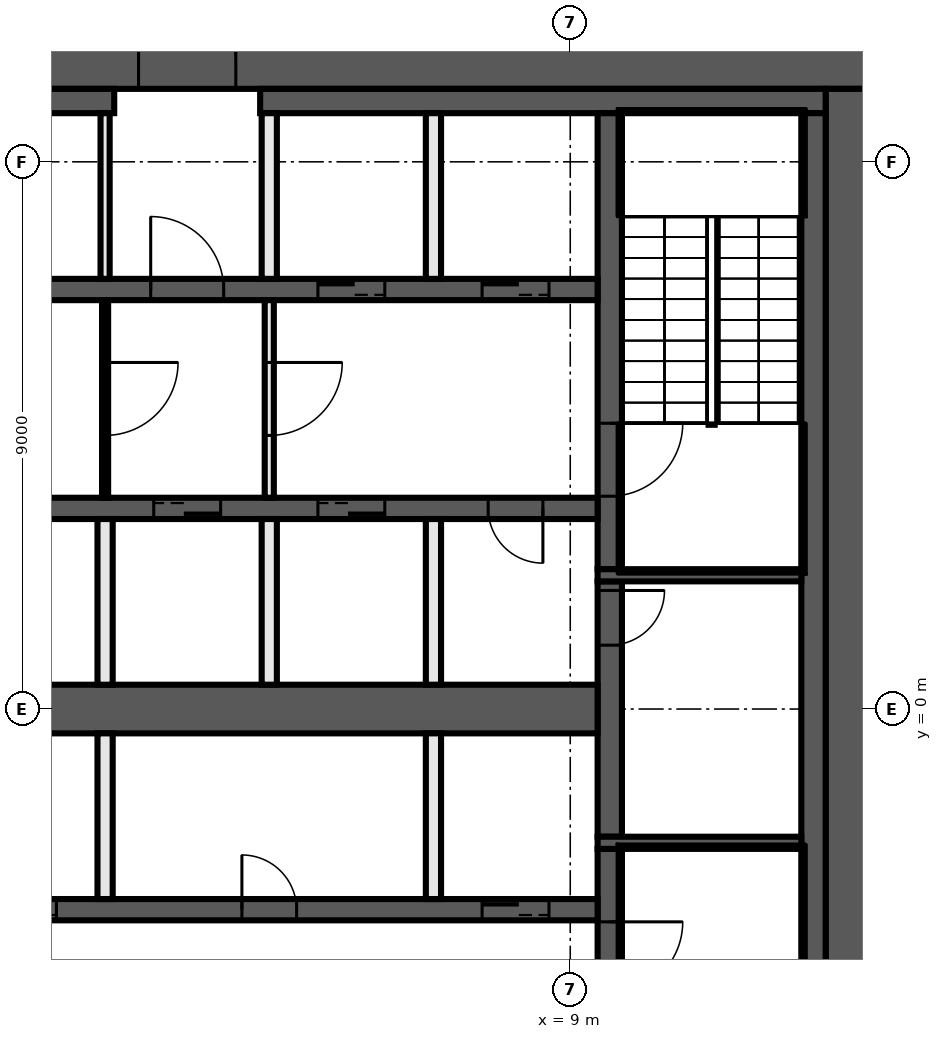
"""IFC4 building model, lengths in metres.
Left out: names, types, materials, properties, quantities, classifications, styles, units other than length and angle.
Written with IfcOpenShell. Run it as: python <this file> out.ifc"""

import sys

from ifc_helpers import new_model, si_unit, direction, frame, frame_2d, origin, place, context, subcontext, project, spatial, rectangle, extrude, element, fill, save


model = new_model("IFC4")
c1 = context("Model", 3, precision=1e-05, world=origin(), true_north=direction((0.0, 1.0)))
c2 = subcontext(c1, "Body", "Model", "MODEL_VIEW")
j1 = project(units=[si_unit("LENGTHUNIT", "METRE"), si_unit("PLANEANGLEUNIT", "RADIAN")], contexts=[c1])
p1 = place(None, origin())
s1 = spatial("IfcSite", under=j1, at=p1, CompositionType="ELEMENT")
p2 = place(p1, origin())
s2 = spatial("IfcBuilding", under=s1, at=p2, CompositionType="ELEMENT")
p3 = place(p2, frame((0.0, 0.0, 183.8)))
s3 = spatial("IfcBuildingStorey", under=s2, at=p3, CompositionType="ELEMENT", Elevation=183.8)
p4 = place(p3, frame((-14.0, 10.6, 0.0), z_axis=(0.0, 0.0, 1.0), x_axis=(1.0, 0.0, 0.0)))
e1 = element("IfcWall", 1, at=p4, inside=s3, PredefinedType="SHEAR", context=c2, shape_type="SweptSolid", body=[
    extrude(rectangle(XDim=28.0, YDim=0.8, at=frame_2d((14.0, 0.0))), origin(), (0.0, 0.0, 1.0), 14.62),
])
p5 = place(p4, frame((15.9, 0.0, 0.0)))
e2 = element("IfcOpeningElement", 2, at=p5, cuts=e1, PredefinedType="OPENING", context=c2, shape_type="SweptSolid", body=[
    extrude(rectangle(XDim=1.6, YDim=2.1, at=frame_2d((0.8, 1.05))), frame((0.0, 0.41, 0.0), z_axis=(0.0, -1.0, 0.0), x_axis=(1.0, 0.0, 0.0)), (0.0, 0.0, 1.0), 0.82),
])
p6 = place(p3, frame((13.6, 10.2, 0.0), z_axis=(0.0, 0.0, 1.0), x_axis=(0.0, -1.0, 0.0)))
e3 = element("IfcWall", 3, at=p6, inside=s3, PredefinedType="SHEAR", context=c2, shape_type="SweptSolid", body=[
    extrude(rectangle(XDim=20.4, YDim=0.8, at=frame_2d((10.2, 0.0))), origin(), (0.0, 0.0, 1.0), 14.62),
])
p7 = place(p3, frame((-13.2, 10.0, 0.0), z_axis=(0.0, 0.0, 1.0), x_axis=(1.0, 0.0, 0.0)))
e4 = element("IfcWall", 4, at=p7, inside=s3, PredefinedType="SHEAR", context=c2, shape_type="SweptSolid", body=[
    extrude(rectangle(XDim=14.7, YDim=0.4, at=frame_2d((7.35, 0.0))), origin(), (0.0, 0.0, 1.0), 14.62),
])
p8 = place(p3, frame((3.9, 10.0, 0.0), z_axis=(0.0, 0.0, 1.0), x_axis=(1.0, 0.0, 0.0)))
e5 = element("IfcWall", 5, at=p8, inside=s3, PredefinedType="SHEAR", context=c2, shape_type="SweptSolid", body=[
    extrude(rectangle(XDim=9.3, YDim=0.4, at=frame_2d((4.65, 0.0))), origin(), (0.0, 0.0, 1.0), 14.62),
])
p9 = place(p3, frame((13.0, 9.8, 0.0), z_axis=(0.0, 0.0, 1.0), x_axis=(0.0, -1.0, 0.0)))
e6 = element("IfcWall", 6, at=p9, inside=s3, PredefinedType="SHEAR", context=c2, shape_type="SweptSolid", body=[
    extrude(rectangle(XDim=19.6, YDim=0.4, at=frame_2d((9.8, 0.0))), origin(), (0.0, 0.0, 1.0), 14.62),
])
p10 = place(p3, frame((9.65, -2.3, 0.0), z_axis=(0.0, 0.0, 1.0), x_axis=(0.0, -1.0, 0.0)))
e7 = element("IfcWall", 7, at=p10, inside=s3, PredefinedType="SHEAR", context=c2, shape_type="SweptSolid", body=[
    extrude(rectangle(XDim=7.5, YDim=0.4, at=frame_2d((3.75, 0.0))), origin(), (0.0, 0.0, 1.0), 14.62),
])
p11 = place(p10, frame((1.2, 0.0, 0.0)))
e8 = element("IfcOpeningElement", 8, at=p11, cuts=e7, PredefinedType="OPENING", context=c2, shape_type="SweptSolid", body=[
    extrude(rectangle(XDim=1.2, YDim=2.1, at=frame_2d((0.6, 1.05))), frame((0.0, 0.21, 0.0), z_axis=(0.0, -1.0, 0.0), x_axis=(1.0, 0.0, 0.0)), (0.0, 0.0, 1.0), 0.42),
])
p12 = place(p3, frame((9.65, 2.1, 0.0), z_axis=(0.0, 0.0, 1.0), x_axis=(0.0, -1.0, 0.0)))
e9 = element("IfcWall", 9, at=p12, inside=s3, PredefinedType="SHEAR", context=c2, shape_type="SweptSolid", body=[
    extrude(rectangle(XDim=4.2, YDim=0.4, at=frame_2d((2.1, 0.0))), origin(), (0.0, 0.0, 1.0), 14.62),
])
p13 = place(p12, frame((0.15, 0.0, 0.0)))
e10 = element("IfcOpeningElement", 10, at=p13, cuts=e9, PredefinedType="OPENING", context=c2, shape_type="SweptSolid", body=[
    extrude(rectangle(XDim=0.9, YDim=2.1, at=frame_2d((0.45, 1.05))), frame((0.0, 0.21, 0.0), z_axis=(0.0, -1.0, 0.0), x_axis=(1.0, 0.0, 0.0)), (0.0, 0.0, 1.0), 0.42),
])
p14 = place(p3, frame((9.65, 9.8, 0.0), z_axis=(0.0, 0.0, 1.0), x_axis=(0.0, -1.0, 0.0)))
e11 = element("IfcWall", 11, at=p14, inside=s3, PredefinedType="SHEAR", context=c2, shape_type="SweptSolid", body=[
    extrude(rectangle(XDim=7.5, YDim=0.4, at=frame_2d((3.75, 0.0))), origin(), (0.0, 0.0, 1.0), 14.62),
])
p15 = place(p14, frame((5.1, 0.0, 0.0)))
e12 = element("IfcOpeningElement", 12, at=p15, cuts=e11, PredefinedType="OPENING", context=c2, shape_type="SweptSolid", body=[
    extrude(rectangle(XDim=1.2, YDim=2.1, at=frame_2d((0.6, 1.05))), frame((0.0, 0.21, 0.0), z_axis=(0.0, -1.0, 0.0), x_axis=(1.0, 0.0, 0.0)), (0.0, 0.0, 1.0), 0.42),
])
for number, where, z_axis, x_axis in (
    (13, (9.45, 2.2, 0.0), (0.0, 0.0, 1.0), (1.0, 0.0, 0.0)),
    (14, (9.45, -2.2, 0.0), (0.0, 0.0, 1.0), (1.0, 0.0, 0.0)),
):
    element("IfcWall", number, at=place(p3, frame(where, z_axis=z_axis, x_axis=x_axis)), inside=s3, PredefinedType="SHEAR", context=c2, shape_type="SweptSolid", body=[
        extrude(rectangle(XDim=3.35, YDim=0.2, at=frame_2d((1.675, 0.0))), origin(), (0.0, 0.0, 1.0), 14.62),
    ])
p16 = place(p3, frame((-9.45, 6.9, 0.0), z_axis=(0.0, 0.0, 1.0), x_axis=(1.0, 0.0, 0.0)))
e15 = element("IfcWall", 15, at=p16, inside=s3, PredefinedType="SHEAR", context=c2, shape_type="SweptSolid", body=[
    extrude(rectangle(XDim=18.9, YDim=0.35, at=frame_2d((9.45, 0.0))), origin(), (0.0, 0.0, 1.0), 14.62),
])
p17 = place(p16, frame((11.55, 0.0, 0.0)))
e16 = element("IfcOpeningElement", 16, at=p17, cuts=e15, PredefinedType="OPENING", context=c2, shape_type="SweptSolid", body=[
    extrude(rectangle(XDim=1.2, YDim=2.1, at=frame_2d((0.6, 1.05))), frame((0.0, 0.185, 0.0), z_axis=(0.0, -1.0, 0.0), x_axis=(1.0, 0.0, 0.0)), (0.0, 0.0, 1.0), 0.37),
])
p18 = place(p16, frame((14.3, 0.0, 0.0)))
e17 = element("IfcOpeningElement", 17, at=p18, cuts=e15, PredefinedType="OPENING", context=c2, shape_type="SweptSolid", body=[
    extrude(rectangle(XDim=1.1, YDim=2.1, at=frame_2d((0.55, 1.05))), frame((0.0, 0.185, 0.0), z_axis=(0.0, -1.0, 0.0), x_axis=(1.0, 0.0, 0.0)), (0.0, 0.0, 1.0), 0.37),
])
p19 = place(p16, frame((17.0, 0.0, 0.0)))
e18 = element("IfcOpeningElement", 18, at=p19, cuts=e15, PredefinedType="OPENING", context=c2, shape_type="SweptSolid", body=[
    extrude(rectangle(XDim=1.1, YDim=2.1, at=frame_2d((0.55, 1.05))), frame((0.0, 0.185, 0.0), z_axis=(0.0, -1.0, 0.0), x_axis=(1.0, 0.0, 0.0)), (0.0, 0.0, 1.0), 0.37),
])
p20 = place(p16, frame((3.6, 0.0, 0.0)))
e19 = element("IfcOpeningElement", 19, at=p20, cuts=e15, PredefinedType="OPENING", context=c2, shape_type="SweptSolid", body=[
    extrude(rectangle(XDim=0.9, YDim=2.1, at=frame_2d((0.45, 1.05))), frame((0.0, 0.185, 0.0), z_axis=(0.0, -1.0, 0.0), x_axis=(1.0, 0.0, 0.0)), (0.0, 0.0, 1.0), 0.37),
])
p21 = place(p16, frame((9.0, 0.0, 0.0)))
e20 = element("IfcOpeningElement", 20, at=p21, cuts=e15, PredefinedType="OPENING", context=c2, shape_type="SweptSolid", body=[
    extrude(rectangle(XDim=0.9, YDim=2.1, at=frame_2d((0.45, 1.05))), frame((0.0, 0.185, 0.0), z_axis=(0.0, -1.0, 0.0), x_axis=(1.0, 0.0, 0.0)), (0.0, 0.0, 1.0), 0.37),
])
p22 = place(p3, frame((9.45, 3.3, 0.0), z_axis=(0.0, 0.0, 1.0), x_axis=(-1.0, 0.0, 0.0)))
e21 = element("IfcWall", 21, at=p22, inside=s3, PredefinedType="SHEAR", context=c2, shape_type="SweptSolid", body=[
    extrude(rectangle(XDim=18.9, YDim=0.35, at=frame_2d((9.45, 0.0))), origin(), (0.0, 0.0, 1.0), 14.62),
])
p23 = place(p22, frame((6.2, 0.0, 0.0)))
e22 = element("IfcOpeningElement", 22, at=p23, cuts=e21, PredefinedType="OPENING", context=c2, shape_type="SweptSolid", body=[
    extrude(rectangle(XDim=1.1, YDim=2.1, at=frame_2d((0.55, 1.05))), frame((0.0, 0.185, 0.0), z_axis=(0.0, -1.0, 0.0), x_axis=(1.0, 0.0, 0.0)), (0.0, 0.0, 1.0), 0.37),
])
p24 = place(p22, frame((3.5, 0.0, 0.0)))
e23 = element("IfcOpeningElement", 23, at=p24, cuts=e21, PredefinedType="OPENING", context=c2, shape_type="SweptSolid", body=[
    extrude(rectangle(XDim=1.1, YDim=2.1, at=frame_2d((0.55, 1.05))), frame((0.0, 0.185, 0.0), z_axis=(0.0, -1.0, 0.0), x_axis=(1.0, 0.0, 0.0)), (0.0, 0.0, 1.0), 0.37),
])
p25 = place(p22, frame((0.9, 0.0, 0.0)))
e24 = element("IfcOpeningElement", 24, at=p25, cuts=e21, PredefinedType="OPENING", context=c2, shape_type="SweptSolid", body=[
    extrude(rectangle(XDim=0.9, YDim=2.1, at=frame_2d((0.45, 1.05))), frame((0.0, 0.185, 0.0), z_axis=(0.0, -1.0, 0.0), x_axis=(1.0, 0.0, 0.0)), (0.0, 0.0, 1.0), 0.37),
])
p26 = place(p22, frame((17.1, 0.0, 0.0)))
e25 = element("IfcOpeningElement", 25, at=p26, cuts=e21, PredefinedType="OPENING", context=c2, shape_type="SweptSolid", body=[
    extrude(rectangle(XDim=0.9, YDim=2.1, at=frame_2d((0.45, 1.05))), frame((0.0, 0.185, 0.0), z_axis=(0.0, -1.0, 0.0), x_axis=(1.0, 0.0, 0.0)), (0.0, 0.0, 1.0), 0.37),
])
p27 = place(p22, frame((13.05, 0.0, 0.0)))
e26 = element("IfcOpeningElement", 26, at=p27, cuts=e21, PredefinedType="OPENING", context=c2, shape_type="SweptSolid", body=[
    extrude(rectangle(XDim=0.9, YDim=2.1, at=frame_2d((0.45, 1.05))), frame((0.0, 0.185, 0.0), z_axis=(0.0, -1.0, 0.0), x_axis=(1.0, 0.0, 0.0)), (0.0, 0.0, 1.0), 0.37),
])
p28 = place(p22, frame((9.0, 0.0, 0.0)))
e27 = element("IfcOpeningElement", 27, at=p28, cuts=e21, PredefinedType="OPENING", context=c2, shape_type="SweptSolid", body=[
    extrude(rectangle(XDim=0.9, YDim=2.1, at=frame_2d((0.45, 1.05))), frame((0.0, 0.185, 0.0), z_axis=(0.0, -1.0, 0.0), x_axis=(1.0, 0.0, 0.0)), (0.0, 0.0, 1.0), 0.37),
])
p29 = place(p3, frame((-9.45, -3.3, 0.0), z_axis=(0.0, 0.0, 1.0), x_axis=(1.0, 0.0, 0.0)))
e28 = element("IfcWall", 28, at=p29, inside=s3, PredefinedType="SHEAR", context=c2, shape_type="SweptSolid", body=[
    extrude(rectangle(XDim=18.9, YDim=0.35, at=frame_2d((9.45, 0.0))), origin(), (0.0, 0.0, 1.0), 14.62),
])
p30 = place(p29, frame((0.8, 0.0, 0.0)))
e29 = element("IfcOpeningElement", 29, at=p30, cuts=e28, PredefinedType="OPENING", context=c2, shape_type="SweptSolid", body=[
    extrude(rectangle(XDim=1.1, YDim=2.1, at=frame_2d((0.55, 1.05))), frame((0.0, 0.185, 0.0), z_axis=(0.0, -1.0, 0.0), x_axis=(1.0, 0.0, 0.0)), (0.0, 0.0, 1.0), 0.37),
])
p31 = place(p29, frame((3.5, 0.0, 0.0)))
e30 = element("IfcOpeningElement", 30, at=p31, cuts=e28, PredefinedType="OPENING", context=c2, shape_type="SweptSolid", body=[
    extrude(rectangle(XDim=1.1, YDim=2.1, at=frame_2d((0.55, 1.05))), frame((0.0, 0.185, 0.0), z_axis=(0.0, -1.0, 0.0), x_axis=(1.0, 0.0, 0.0)), (0.0, 0.0, 1.0), 0.37),
])
p32 = place(p29, frame((6.2, 0.0, 0.0)))
e31 = element("IfcOpeningElement", 31, at=p32, cuts=e28, PredefinedType="OPENING", context=c2, shape_type="SweptSolid", body=[
    extrude(rectangle(XDim=1.1, YDim=2.1, at=frame_2d((0.55, 1.05))), frame((0.0, 0.185, 0.0), z_axis=(0.0, -1.0, 0.0), x_axis=(1.0, 0.0, 0.0)), (0.0, 0.0, 1.0), 0.37),
])
p33 = place(p29, frame((8.9, 0.0, 0.0)))
e32 = element("IfcOpeningElement", 32, at=p33, cuts=e28, PredefinedType="OPENING", context=c2, shape_type="SweptSolid", body=[
    extrude(rectangle(XDim=1.1, YDim=2.1, at=frame_2d((0.55, 1.05))), frame((0.0, 0.185, 0.0), z_axis=(0.0, -1.0, 0.0), x_axis=(1.0, 0.0, 0.0)), (0.0, 0.0, 1.0), 0.37),
])
p34 = place(p29, frame((17.0, 0.0, 0.0)))
e33 = element("IfcOpeningElement", 33, at=p34, cuts=e28, PredefinedType="OPENING", context=c2, shape_type="SweptSolid", body=[
    extrude(rectangle(XDim=1.1, YDim=2.1, at=frame_2d((0.55, 1.05))), frame((0.0, 0.185, 0.0), z_axis=(0.0, -1.0, 0.0), x_axis=(1.0, 0.0, 0.0)), (0.0, 0.0, 1.0), 0.37),
])
p35 = place(p29, frame((13.05, 0.0, 0.0)))
e34 = element("IfcOpeningElement", 34, at=p35, cuts=e28, PredefinedType="OPENING", context=c2, shape_type="SweptSolid", body=[
    extrude(rectangle(XDim=0.9, YDim=2.1, at=frame_2d((0.45, 1.05))), frame((0.0, 0.185, 0.0), z_axis=(0.0, -1.0, 0.0), x_axis=(1.0, 0.0, 0.0)), (0.0, 0.0, 1.0), 0.37),
])
p36 = place(p3, frame((-9.45, 0.0, 0.0), z_axis=(0.0, 0.0, 1.0), x_axis=(1.0, 0.0, 0.0)))
e35 = element("IfcWall", 35, at=p36, inside=s3, PredefinedType="SHEAR", context=c2, shape_type="SweptSolid", body=[
    extrude(rectangle(XDim=18.9, YDim=0.8, at=frame_2d((9.45, 0.0))), origin(), (0.0, 0.0, 1.0), 14.62),
])
for number, where, z_axis, x_axis in (
    (36, (6.75, -3.125, 0.0), (0.0, 0.0, 1.0), (0.0, 1.0, 0.0)),
    (37, (6.75, 0.4, 0.0), (0.0, 0.0, 1.0), (0.0, 1.0, 0.0)),
    (38, (6.75, 7.075, 0.0), (0.0, 0.0, 1.0), (0.0, 1.0, 0.0)),
):
    element("IfcWall", number, at=place(p3, frame(where, z_axis=z_axis, x_axis=x_axis)), inside=s3, PredefinedType="SOLIDWALL", context=c2, shape_type="SweptSolid", body=[
        extrude(rectangle(XDim=2.725, YDim=0.25, at=frame_2d((1.363, 0.0))), origin(), (0.0, 0.0, 1.0), 14.62),
    ])
p37 = place(p3, frame((4.05, 6.725, 0.0), z_axis=(0.0, 0.0, 1.0), x_axis=(0.0, -1.0, 0.0)))
e39 = element("IfcWall", 39, at=p37, inside=s3, PredefinedType="PARTITIONING", context=c2, shape_type="SweptSolid", body=[
    extrude(rectangle(XDim=3.25, YDim=0.15, at=frame_2d((1.625, 0.0))), origin(), (0.0, 0.0, 1.0), 14.62),
])
p38 = place(p37, frame((1.025, 0.0, 0.0)))
e40 = element("IfcOpeningElement", 40, at=p38, cuts=e39, PredefinedType="OPENING", context=c2, shape_type="SweptSolid", body=[
    extrude(rectangle(XDim=1.2, YDim=2.1, at=frame_2d((0.6, 1.05))), frame((0.0, 0.085, 0.0), z_axis=(0.0, -1.0, 0.0), x_axis=(1.0, 0.0, 0.0)), (0.0, 0.0, 1.0), 0.17),
])
for number, where, z_axis, x_axis in (
    (41, (4.05, 0.4, 0.0), (0.0, 0.0, 1.0), (0.0, 1.0, 0.0)),
    (42, (4.05, 7.075, 0.0), (0.0, 0.0, 1.0), (0.0, 1.0, 0.0)),
):
    element("IfcWall", number, at=place(p3, frame(where, z_axis=z_axis, x_axis=x_axis)), inside=s3, PredefinedType="SOLIDWALL", context=c2, shape_type="SweptSolid", body=[
        extrude(rectangle(XDim=2.725, YDim=0.25, at=frame_2d((1.363, 0.0))), origin(), (0.0, 0.0, 1.0), 14.62),
    ])
p39 = place(p3, frame((1.35, 7.075, 0.0), z_axis=(0.0, 0.0, 1.0), x_axis=(0.0, 1.0, 0.0)))
e43 = element("IfcWall", 43, at=p39, inside=s3, PredefinedType="PARTITIONING", context=c2, shape_type="SweptSolid", body=[
    extrude(rectangle(XDim=2.725, YDim=0.15, at=frame_2d((1.363, 0.0))), origin(), (0.0, 0.0, 1.0), 14.62),
])
p40 = place(p3, frame((1.35, 6.725, 0.0), z_axis=(0.0, 0.0, 1.0), x_axis=(0.0, -1.0, 0.0)))
e44 = element("IfcWall", 44, at=p40, inside=s3, PredefinedType="PARTITIONING", context=c2, shape_type="SweptSolid", body=[
    extrude(rectangle(XDim=3.25, YDim=0.1, at=frame_2d((1.625, 0.0))), origin(), (0.0, 0.0, 1.0), 14.62),
])
p41 = place(p40, frame((1.025, 0.0, 0.0)))
e45 = element("IfcOpeningElement", 45, at=p41, cuts=e44, PredefinedType="OPENING", context=c2, shape_type="SweptSolid", body=[
    extrude(rectangle(XDim=1.2, YDim=2.1, at=frame_2d((0.6, 1.05))), frame((0.0, 0.06, 0.0), z_axis=(0.0, -1.0, 0.0), x_axis=(1.0, 0.0, 0.0)), (0.0, 0.0, 1.0), 0.12),
])
for number, where, z_axis, x_axis in (
    (46, (1.35, -3.125, 0.0), (0.0, 0.0, 1.0), (0.0, 1.0, 0.0)),
    (47, (1.35, 0.4, 0.0), (0.0, 0.0, 1.0), (0.0, 1.0, 0.0)),
):
    element("IfcWall", number, at=place(p3, frame(where, z_axis=z_axis, x_axis=x_axis)), inside=s3, PredefinedType="SOLIDWALL", context=c2, shape_type="SweptSolid", body=[
        extrude(rectangle(XDim=2.725, YDim=0.25, at=frame_2d((1.363, 0.0))), origin(), (0.0, 0.0, 1.0), 14.62),
    ])
p42 = place(p13, origin())
e48 = element("IfcDoor", 48, at=p42, inside=s3, OperationType="SINGLE_SWING_RIGHT", PredefinedType="DOOR", context=c2, shape_type="SweptSolid", body=[
    extrude(rectangle(XDim=0.9, YDim=2.1, at=frame_2d((0.45, 1.05))), frame((0.0, 0.025, 0.0), z_axis=(0.0, -1.0, 0.0), x_axis=(1.0, 0.0, 0.0)), (0.0, 0.0, 1.0), 0.05),
])
fill(e10, e48)
p43 = place(p5, origin())
e49 = element("IfcDoor", 49, at=p43, inside=s3, OperationType="DOUBLE_DOOR_SINGLE_SWING", PredefinedType="DOOR", context=c2, shape_type="SweptSolid", body=[
    extrude(rectangle(XDim=1.6, YDim=2.1, at=frame_2d((0.8, 1.05))), frame((0.0, 0.025, 0.0), z_axis=(0.0, -1.0, 0.0), x_axis=(1.0, 0.0, 0.0)), (0.0, 0.0, 1.0), 0.05),
])
fill(e2, e49)
p44 = place(p17, origin())
e50 = element("IfcDoor", 50, at=p44, inside=s3, OperationType="SINGLE_SWING_LEFT", PredefinedType="DOOR", context=c2, shape_type="SweptSolid", body=[
    extrude(rectangle(XDim=1.2, YDim=2.1, at=frame_2d((0.6, 1.05))), frame((0.0, 0.025, 0.0), z_axis=(0.0, -1.0, 0.0), x_axis=(1.0, 0.0, 0.0)), (0.0, 0.0, 1.0), 0.05),
])
fill(e16, e50)
p45 = place(p18, origin())
e51 = element("IfcDoor", 51, at=p45, inside=s3, OperationType="DOUBLE_DOOR_SLIDING", PredefinedType="DOOR", context=c2, shape_type="SweptSolid", body=[
    extrude(rectangle(XDim=1.1, YDim=2.1, at=frame_2d((0.55, 1.05))), frame((0.0, 0.025, 0.0), z_axis=(0.0, -1.0, 0.0), x_axis=(1.0, 0.0, 0.0)), (0.0, 0.0, 1.0), 0.05),
])
fill(e17, e51)
p46 = place(p19, origin())
e52 = element("IfcDoor", 52, at=p46, inside=s3, OperationType="DOUBLE_DOOR_SLIDING", PredefinedType="DOOR", context=c2, shape_type="SweptSolid", body=[
    extrude(rectangle(XDim=1.1, YDim=2.1, at=frame_2d((0.55, 1.05))), frame((0.0, 0.025, 0.0), z_axis=(0.0, -1.0, 0.0), x_axis=(1.0, 0.0, 0.0)), (0.0, 0.0, 1.0), 0.05),
])
fill(e18, e52)
p47 = place(p23, origin())
e53 = element("IfcDoor", 53, at=p47, inside=s3, OperationType="DOUBLE_DOOR_SLIDING", PredefinedType="DOOR", context=c2, shape_type="SweptSolid", body=[
    extrude(rectangle(XDim=1.1, YDim=2.1, at=frame_2d((0.55, 1.05))), frame((0.0, 0.025, 0.0), z_axis=(0.0, -1.0, 0.0), x_axis=(1.0, 0.0, 0.0)), (0.0, 0.0, 1.0), 0.05),
])
fill(e22, e53)
p48 = place(p24, origin())
e54 = element("IfcDoor", 54, at=p48, inside=s3, OperationType="DOUBLE_DOOR_SLIDING", PredefinedType="DOOR", context=c2, shape_type="SweptSolid", body=[
    extrude(rectangle(XDim=1.1, YDim=2.1, at=frame_2d((0.55, 1.05))), frame((0.0, 0.025, 0.0), z_axis=(0.0, -1.0, 0.0), x_axis=(1.0, 0.0, 0.0)), (0.0, 0.0, 1.0), 0.05),
])
fill(e23, e54)
p49 = place(p25, origin())
e55 = element("IfcDoor", 55, at=p49, inside=s3, OperationType="SINGLE_SWING_LEFT", PredefinedType="DOOR", context=c2, shape_type="SweptSolid", body=[
    extrude(rectangle(XDim=0.9, YDim=2.1, at=frame_2d((0.45, 1.05))), frame((0.0, 0.025, 0.0), z_axis=(0.0, -1.0, 0.0), x_axis=(1.0, 0.0, 0.0)), (0.0, 0.0, 1.0), 0.05),
])
fill(e24, e55)
p50 = place(p33, origin())
e56 = element("IfcDoor", 56, at=p50, inside=s3, OperationType="DOUBLE_DOOR_SLIDING", PredefinedType="DOOR", context=c2, shape_type="SweptSolid", body=[
    extrude(rectangle(XDim=1.1, YDim=2.1, at=frame_2d((0.55, 1.05))), frame((0.0, 0.025, 0.0), z_axis=(0.0, -1.0, 0.0), x_axis=(1.0, 0.0, 0.0)), (0.0, 0.0, 1.0), 0.05),
])
fill(e32, e56)
p51 = place(p34, origin())
e57 = element("IfcDoor", 57, at=p51, inside=s3, OperationType="DOUBLE_DOOR_SLIDING", PredefinedType="DOOR", context=c2, shape_type="SweptSolid", body=[
    extrude(rectangle(XDim=1.1, YDim=2.1, at=frame_2d((0.55, 1.05))), frame((0.0, 0.025, 0.0), z_axis=(0.0, -1.0, 0.0), x_axis=(1.0, 0.0, 0.0)), (0.0, 0.0, 1.0), 0.05),
])
fill(e33, e57)
p52 = place(p35, origin())
e58 = element("IfcDoor", 58, at=p52, inside=s3, OperationType="SINGLE_SWING_LEFT", PredefinedType="DOOR", context=c2, shape_type="SweptSolid", body=[
    extrude(rectangle(XDim=0.9, YDim=2.1, at=frame_2d((0.45, 1.05))), frame((0.0, 0.025, 0.0), z_axis=(0.0, -1.0, 0.0), x_axis=(1.0, 0.0, 0.0)), (0.0, 0.0, 1.0), 0.05),
])
fill(e34, e58)
p53 = place(p15, origin())
e59 = element("IfcDoor", 59, at=p53, inside=s3, OperationType="SINGLE_SWING_LEFT", PredefinedType="DOOR", context=c2, shape_type="SweptSolid", body=[
    extrude(rectangle(XDim=1.2, YDim=2.1, at=frame_2d((0.6, 1.05))), frame((0.0, 0.025, 0.0), z_axis=(0.0, -1.0, 0.0), x_axis=(1.0, 0.0, 0.0)), (0.0, 0.0, 1.0), 0.05),
])
fill(e12, e59)
p54 = place(p11, origin())
e60 = element("IfcDoor", 60, at=p54, inside=s3, OperationType="SINGLE_SWING_RIGHT", PredefinedType="DOOR", context=c2, shape_type="SweptSolid", body=[
    extrude(rectangle(XDim=1.2, YDim=2.1, at=frame_2d((0.6, 1.05))), frame((0.0, 0.025, 0.0), z_axis=(0.0, -1.0, 0.0), x_axis=(1.0, 0.0, 0.0)), (0.0, 0.0, 1.0), 0.05),
])
fill(e8, e60)
p55 = place(p41, origin())
e61 = element("IfcDoor", 61, at=p55, inside=s3, OperationType="SINGLE_SWING_LEFT", PredefinedType="DOOR", context=c2, shape_type="SweptSolid", body=[
    extrude(rectangle(XDim=1.2, YDim=2.1, at=frame_2d((0.6, 1.05))), frame((0.0, 0.025, 0.0), z_axis=(0.0, -1.0, 0.0), x_axis=(1.0, 0.0, 0.0)), (0.0, 0.0, 1.0), 0.05),
])
fill(e45, e61)
p56 = place(p38, origin())
e62 = element("IfcDoor", 62, at=p56, inside=s3, OperationType="SINGLE_SWING_RIGHT", PredefinedType="DOOR", context=c2, shape_type="SweptSolid", body=[
    extrude(rectangle(XDim=1.2, YDim=2.1, at=frame_2d((0.6, 1.05))), frame((0.0, 0.025, 0.0), z_axis=(0.0, -1.0, 0.0), x_axis=(1.0, 0.0, 0.0)), (0.0, 0.0, 1.0), 0.05),
])
fill(e40, e62)
save(model, sys.argv[1])
